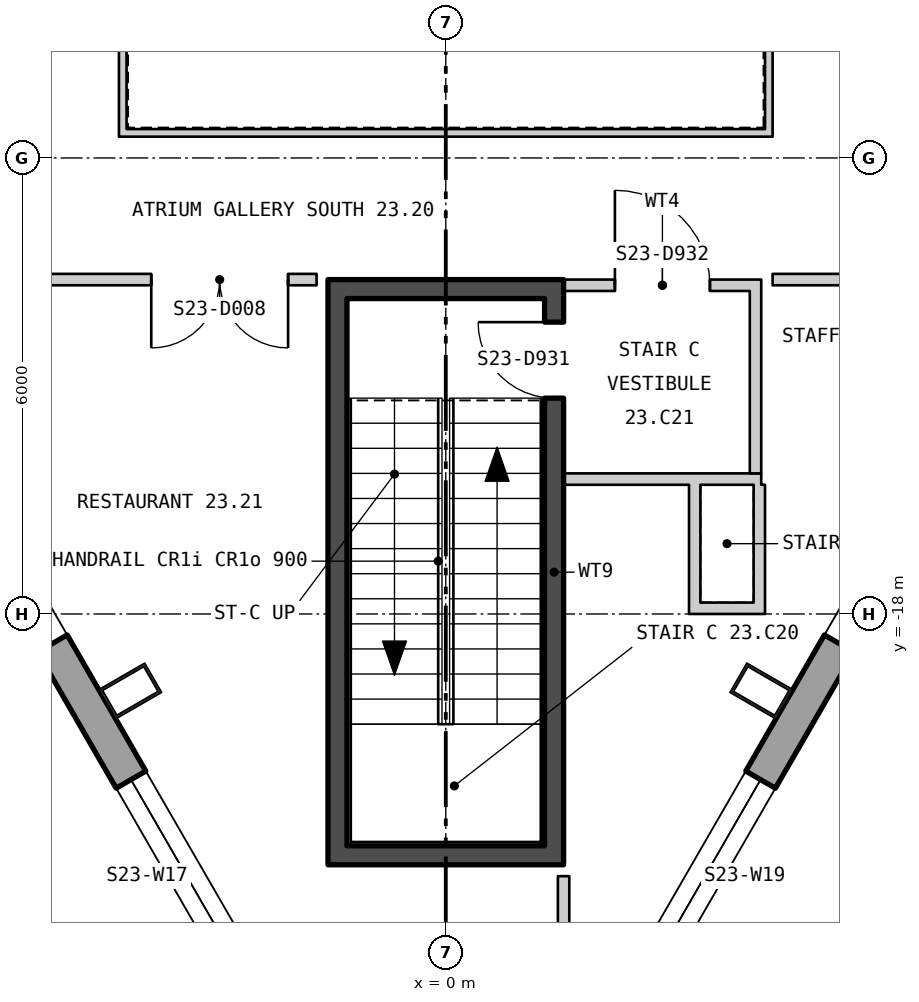
"""IFC4 building model, lengths in metres.
Left out: names, types, materials, properties, quantities, classifications, styles, units other than length and angle.
Written with IfcOpenShell. Run it as: python <this file> out.ifc"""

import sys

from ifc_helpers import new_model, si_unit, direction, frame, frame_2d, origin, origin_2d, place, context, subcontext, project, spatial, polyline, rectangle, hollow_rectangle, outline, extrude, element, fill, save


model = new_model("IFC4")
c1 = context("Model", 3, precision=1e-05, world=origin(), true_north=direction((0.0, 1.0)))
c2 = subcontext(c1, "Body", "Model", "MODEL_VIEW")
j1 = project(units=[si_unit("LENGTHUNIT", "METRE"), si_unit("PLANEANGLEUNIT", "RADIAN")], contexts=[c1])
p1 = place(None, origin())
s1 = spatial("IfcSite", under=j1, at=p1, CompositionType="ELEMENT")
p2 = place(p1, origin())
s2 = spatial("IfcBuilding", under=s1, at=p2, CompositionType="ELEMENT")
p3 = place(p2, frame((0.0, 0.0, 304.2)))
s3 = spatial("IfcBuildingStorey", under=s2, at=p3, CompositionType="ELEMENT", Elevation=304.2)
for number, where, z_axis, x_axis in (
    (1, (-4.151, -19.013, 0.0), (0.0, 0.0, 1.0), (0.5, -0.866, 0.0)),
    (2, (4.151, -19.013, 0.0), (0.0, 0.0, 1.0), (0.5, 0.866, 0.0)),
):
    element("IfcColumn", number, at=place(p3, frame(where, z_axis=z_axis, x_axis=x_axis)), inside=s3, PredefinedType="COLUMN", context=c2, shape_type="SweptSolid", body=[
        extrude(hollow_rectangle(XDim=0.45, YDim=0.7, WallThickness=0.04, at=origin_2d()), origin(), (0.0, 0.0, 1.0), 4.2),
    ])
p4 = place(p3, frame((-25.095, 16.112, -0.18), z_axis=(0.0, 0.0, 1.0), x_axis=(0.500000141277, -0.866025322218, 0.0)))
e3 = element("IfcWall", 3, at=p4, inside=s3, PredefinedType="SOLIDWALL", context=c2, shape_type="SweptSolid", body=[
    extrude(outline(polyline([(-0.13, -0.225), (45.86, -0.225), (45.6, 0.225), (0.13, 0.225), (-0.13, -0.225)])), origin(), (0.0, 0.0, 1.0), 3.98),
])
p5 = place(p4, frame((1.424, 0.0, 1.08)))
e4 = element("IfcOpeningElement", 4, at=p5, cuts=e3, PredefinedType="OPENING", context=c2, shape_type="SweptSolid", body=[
    extrude(rectangle(XDim=2.4, YDim=2.3, at=frame_2d((1.2, 1.15))), frame((0.0, 0.235, 0.0), z_axis=(0.0, -1.0, 0.0), x_axis=(1.0, 0.0, 0.0)), (0.0, 0.0, 1.0), 0.47),
])
p6 = place(p4, frame((5.892, 0.0, 1.08)))
e5 = element("IfcOpeningElement", 5, at=p6, cuts=e3, PredefinedType="OPENING", context=c2, shape_type="SweptSolid", body=[
    extrude(rectangle(XDim=2.4, YDim=2.3, at=frame_2d((1.2, 1.15))), frame((0.0, 0.235, 0.0), z_axis=(0.0, -1.0, 0.0), x_axis=(1.0, 0.0, 0.0)), (0.0, 0.0, 1.0), 0.47),
])
p7 = place(p4, frame((10.399, 0.0, 1.08)))
e6 = element("IfcOpeningElement", 6, at=p7, cuts=e3, PredefinedType="OPENING", context=c2, shape_type="SweptSolid", body=[
    extrude(rectangle(XDim=2.4, YDim=2.3, at=frame_2d((1.2, 1.15))), frame((0.0, 0.235, 0.0), z_axis=(0.0, -1.0, 0.0), x_axis=(1.0, 0.0, 0.0)), (0.0, 0.0, 1.0), 0.47),
])
p8 = place(p4, frame((14.905, 0.0, 1.08)))
e7 = element("IfcOpeningElement", 7, at=p8, cuts=e3, PredefinedType="OPENING", context=c2, shape_type="SweptSolid", body=[
    extrude(rectangle(XDim=2.4, YDim=2.3, at=frame_2d((1.2, 1.15))), frame((0.0, 0.235, 0.0), z_axis=(0.0, -1.0, 0.0), x_axis=(1.0, 0.0, 0.0)), (0.0, 0.0, 1.0), 0.47),
])
p9 = place(p4, frame((19.412, 0.0, 1.08)))
e8 = element("IfcOpeningElement", 8, at=p9, cuts=e3, PredefinedType="OPENING", context=c2, shape_type="SweptSolid", body=[
    extrude(rectangle(XDim=2.4, YDim=2.3, at=frame_2d((1.2, 1.15))), frame((0.0, 0.235, 0.0), z_axis=(0.0, -1.0, 0.0), x_axis=(1.0, 0.0, 0.0)), (0.0, 0.0, 1.0), 0.47),
])
p10 = place(p4, frame((28.425, 0.0, 1.08)))
e9 = element("IfcOpeningElement", 9, at=p10, cuts=e3, PredefinedType="OPENING", context=c2, shape_type="SweptSolid", body=[
    extrude(rectangle(XDim=2.4, YDim=2.3, at=frame_2d((1.2, 1.15))), frame((0.0, 0.235, 0.0), z_axis=(0.0, -1.0, 0.0), x_axis=(1.0, 0.0, 0.0)), (0.0, 0.0, 1.0), 0.47),
])
p11 = place(p4, frame((32.932, 0.0, 1.08)))
e10 = element("IfcOpeningElement", 10, at=p11, cuts=e3, PredefinedType="OPENING", context=c2, shape_type="SweptSolid", body=[
    extrude(rectangle(XDim=2.4, YDim=2.3, at=frame_2d((1.2, 1.15))), frame((0.0, 0.235, 0.0), z_axis=(0.0, -1.0, 0.0), x_axis=(1.0, 0.0, 0.0)), (0.0, 0.0, 1.0), 0.47),
])
p12 = place(p4, frame((37.438, 0.0, 1.08)))
e11 = element("IfcOpeningElement", 11, at=p12, cuts=e3, PredefinedType="OPENING", context=c2, shape_type="SweptSolid", body=[
    extrude(rectangle(XDim=2.4, YDim=2.3, at=frame_2d((1.2, 1.15))), frame((0.0, 0.235, 0.0), z_axis=(0.0, -1.0, 0.0), x_axis=(1.0, 0.0, 0.0)), (0.0, 0.0, 1.0), 0.47),
])
p13 = place(p4, frame((41.907, 0.0, 1.08)))
e12 = element("IfcOpeningElement", 12, at=p13, cuts=e3, PredefinedType="OPENING", context=c2, shape_type="SweptSolid", body=[
    extrude(rectangle(XDim=2.4, YDim=2.3, at=frame_2d((1.2, 1.15))), frame((0.0, 0.235, 0.0), z_axis=(0.0, -1.0, 0.0), x_axis=(1.0, 0.0, 0.0)), (0.0, 0.0, 1.0), 0.47),
])
p14 = place(p3, frame((2.23, -23.491, -0.18), z_axis=(0.0, 0.0, 1.0), x_axis=(0.500000141277, 0.866025322218, 0.0)))
e13 = element("IfcWall", 13, at=p14, inside=s3, PredefinedType="SOLIDWALL", context=c2, shape_type="SweptSolid", body=[
    extrude(outline(polyline([(-0.13, -0.225), (45.86, -0.225), (45.6, 0.225), (0.13, 0.225), (-0.13, -0.225)])), origin(), (0.0, 0.0, 1.0), 3.98),
])
p15 = place(p14, frame((1.424, 0.0, 1.08)))
e14 = element("IfcOpeningElement", 14, at=p15, cuts=e13, PredefinedType="OPENING", context=c2, shape_type="SweptSolid", body=[
    extrude(rectangle(XDim=2.4, YDim=2.3, at=frame_2d((1.2, 1.15))), frame((0.0, 0.235, 0.0), z_axis=(0.0, -1.0, 0.0), x_axis=(1.0, 0.0, 0.0)), (0.0, 0.0, 1.0), 0.47),
])
p16 = place(p14, frame((5.892, 0.0, 1.08)))
e15 = element("IfcOpeningElement", 15, at=p16, cuts=e13, PredefinedType="OPENING", context=c2, shape_type="SweptSolid", body=[
    extrude(rectangle(XDim=2.4, YDim=2.3, at=frame_2d((1.2, 1.15))), frame((0.0, 0.235, 0.0), z_axis=(0.0, -1.0, 0.0), x_axis=(1.0, 0.0, 0.0)), (0.0, 0.0, 1.0), 0.47),
])
p17 = place(p14, frame((10.399, 0.0, 1.08)))
e16 = element("IfcOpeningElement", 16, at=p17, cuts=e13, PredefinedType="OPENING", context=c2, shape_type="SweptSolid", body=[
    extrude(rectangle(XDim=2.4, YDim=2.3, at=frame_2d((1.2, 1.15))), frame((0.0, 0.235, 0.0), z_axis=(0.0, -1.0, 0.0), x_axis=(1.0, 0.0, 0.0)), (0.0, 0.0, 1.0), 0.47),
])
p18 = place(p14, frame((14.905, 0.0, 1.08)))
e17 = element("IfcOpeningElement", 17, at=p18, cuts=e13, PredefinedType="OPENING", context=c2, shape_type="SweptSolid", body=[
    extrude(rectangle(XDim=2.4, YDim=2.3, at=frame_2d((1.2, 1.15))), frame((0.0, 0.235, 0.0), z_axis=(0.0, -1.0, 0.0), x_axis=(1.0, 0.0, 0.0)), (0.0, 0.0, 1.0), 0.47),
])
p19 = place(p14, frame((19.412, 0.0, 1.08)))
e18 = element("IfcOpeningElement", 18, at=p19, cuts=e13, PredefinedType="OPENING", context=c2, shape_type="SweptSolid", body=[
    extrude(rectangle(XDim=2.4, YDim=2.3, at=frame_2d((1.2, 1.15))), frame((0.0, 0.235, 0.0), z_axis=(0.0, -1.0, 0.0), x_axis=(1.0, 0.0, 0.0)), (0.0, 0.0, 1.0), 0.47),
])
p20 = place(p14, frame((23.918, 0.0, 1.08)))
e19 = element("IfcOpeningElement", 19, at=p20, cuts=e13, PredefinedType="OPENING", context=c2, shape_type="SweptSolid", body=[
    extrude(rectangle(XDim=2.4, YDim=2.3, at=frame_2d((1.2, 1.15))), frame((0.0, 0.235, 0.0), z_axis=(0.0, -1.0, 0.0), x_axis=(1.0, 0.0, 0.0)), (0.0, 0.0, 1.0), 0.47),
])
p21 = place(p14, frame((28.425, 0.0, 1.08)))
e20 = element("IfcOpeningElement", 20, at=p21, cuts=e13, PredefinedType="OPENING", context=c2, shape_type="SweptSolid", body=[
    extrude(rectangle(XDim=2.4, YDim=2.3, at=frame_2d((1.2, 1.15))), frame((0.0, 0.235, 0.0), z_axis=(0.0, -1.0, 0.0), x_axis=(1.0, 0.0, 0.0)), (0.0, 0.0, 1.0), 0.47),
])
p22 = place(p14, frame((32.932, 0.0, 1.08)))
e21 = element("IfcOpeningElement", 21, at=p22, cuts=e13, PredefinedType="OPENING", context=c2, shape_type="SweptSolid", body=[
    extrude(rectangle(XDim=2.4, YDim=2.3, at=frame_2d((1.2, 1.15))), frame((0.0, 0.235, 0.0), z_axis=(0.0, -1.0, 0.0), x_axis=(1.0, 0.0, 0.0)), (0.0, 0.0, 1.0), 0.47),
])
p23 = place(p14, frame((37.438, 0.0, 1.08)))
e22 = element("IfcOpeningElement", 22, at=p23, cuts=e13, PredefinedType="OPENING", context=c2, shape_type="SweptSolid", body=[
    extrude(rectangle(XDim=2.4, YDim=2.3, at=frame_2d((1.2, 1.15))), frame((0.0, 0.235, 0.0), z_axis=(0.0, -1.0, 0.0), x_axis=(1.0, 0.0, 0.0)), (0.0, 0.0, 1.0), 0.47),
])
p24 = place(p14, frame((41.907, 0.0, 1.08)))
e23 = element("IfcOpeningElement", 23, at=p24, cuts=e13, PredefinedType="OPENING", context=c2, shape_type="SweptSolid", body=[
    extrude(rectangle(XDim=2.4, YDim=2.3, at=frame_2d((1.2, 1.15))), frame((0.0, 0.235, 0.0), z_axis=(0.0, -1.0, 0.0), x_axis=(1.0, 0.0, 0.0)), (0.0, 0.0, 1.0), 0.47),
])
p25 = place(p3, frame((-4.3, -11.67, 0.0), z_axis=(0.0, 0.0, 1.0), x_axis=(1.0, 0.0, 0.0)))
e24 = element("IfcWall", 24, at=p25, inside=s3, PredefinedType="PARTITIONING", context=c2, shape_type="SweptSolid", body=[
    extrude(rectangle(XDim=8.6, YDim=0.1, at=frame_2d((4.3, 0.0))), origin(), (0.0, 0.0, 1.0), 4.0),
])
for number, where, z_axis, x_axis in (
    (25, (4.25, -11.62, 0.0), (0.0, 0.0, 1.0), (0.0, 1.0, 0.0)),
    (26, (-4.25, -3.58, 0.0), (0.0, 0.0, 1.0), (0.0, -1.0, 0.0)),
):
    element("IfcWall", number, at=place(p3, frame(where, z_axis=z_axis, x_axis=x_axis)), inside=s3, PredefinedType="PARTITIONING", context=c2, shape_type="SweptSolid", body=[
        extrude(rectangle(XDim=8.04, YDim=0.1, at=frame_2d((4.02, 0.0))), origin(), (0.0, 0.0, 1.0), 4.0),
    ])
p26 = place(p3, frame((-1.425, -21.05, 0.0), z_axis=(0.0, 0.0, 1.0), x_axis=(0.0, 1.0, 0.0)))
e27 = element("IfcWall", 27, at=p26, inside=s3, PredefinedType="SHEAR", context=c2, shape_type="SweptSolid", body=[
    extrude(rectangle(XDim=7.2, YDim=0.25, at=frame_2d((3.6, 0.0))), origin(), (0.0, 0.0, 1.0), 4.0),
])
p27 = place(p3, frame((1.425, -21.05, 0.0), z_axis=(0.0, 0.0, 1.0), x_axis=(0.0, 1.0, 0.0)))
e28 = element("IfcWall", 28, at=p27, inside=s3, PredefinedType="SHEAR", context=c2, shape_type="SweptSolid", body=[
    extrude(rectangle(XDim=7.2, YDim=0.25, at=frame_2d((3.6, 0.0))), origin(), (0.0, 0.0, 1.0), 4.0),
])
p28 = place(p27, frame((5.89, 0.0, 0.0)))
e29 = element("IfcOpeningElement", 29, at=p28, cuts=e28, PredefinedType="OPENING", context=c2, shape_type="SweptSolid", body=[
    extrude(rectangle(XDim=1.0, YDim=2.1, at=frame_2d((0.5, 1.05))), frame((0.0, 0.135, 0.0), z_axis=(0.0, -1.0, 0.0), x_axis=(1.0, 0.0, 0.0)), (0.0, 0.0, 1.0), 0.27),
])
for number, where, z_axis, x_axis in (
    (30, (-1.55, -21.175, 0.0), (0.0, 0.0, 1.0), (1.0, 0.0, 0.0)),
    (31, (-1.55, -13.725, 0.0), (0.0, 0.0, 1.0), (1.0, 0.0, 0.0)),
):
    element("IfcWall", number, at=place(p3, frame(where, z_axis=z_axis, x_axis=x_axis)), inside=s3, PredefinedType="SHEAR", context=c2, shape_type="SweptSolid", body=[
        extrude(rectangle(XDim=3.1, YDim=0.25, at=frame_2d((1.55, 0.0))), origin(), (0.0, 0.0, 1.0), 4.0),
    ])
p29 = place(p3, frame((1.55, -16.225, 0.0), z_axis=(0.0, 0.0, 1.0), x_axis=(1.0, 0.0, 0.0)))
e32 = element("IfcWall", 32, at=p29, inside=s3, PredefinedType="PARTITIONING", context=c2, shape_type="SweptSolid", body=[
    extrude(rectangle(XDim=2.6, YDim=0.15, at=frame_2d((1.3, 0.0))), origin(), (0.0, 0.0, 1.0), 4.0),
])
p30 = place(p3, frame((4.075, -16.15, 0.0), z_axis=(0.0, 0.0, 1.0), x_axis=(0.0, 1.0, 0.0)))
e33 = element("IfcWall", 33, at=p30, inside=s3, PredefinedType="PARTITIONING", context=c2, shape_type="SweptSolid", body=[
    extrude(rectangle(XDim=2.4, YDim=0.15, at=frame_2d((1.2, 0.0))), origin(), (0.0, 0.0, 1.0), 4.0),
])
p31 = place(p3, frame((1.55, -13.675, 0.0), z_axis=(0.0, 0.0, 1.0), x_axis=(1.0, 0.0, 0.0)))
e34 = element("IfcWall", 34, at=p31, inside=s3, PredefinedType="PARTITIONING", context=c2, shape_type="SweptSolid", body=[
    extrude(rectangle(XDim=2.6, YDim=0.15, at=frame_2d((1.3, 0.0))), origin(), (0.0, 0.0, 1.0), 3.186),
])
p32 = place(p31, frame((0.675, 0.0, 0.0)))
e35 = element("IfcOpeningElement", 35, at=p32, cuts=e34, PredefinedType="OPENING", context=c2, shape_type="SweptSolid", body=[
    extrude(rectangle(XDim=1.25, YDim=2.1, at=frame_2d((0.625, 1.05))), frame((0.0, 0.085, 0.0), z_axis=(0.0, -1.0, 0.0), x_axis=(1.0, 0.0, 0.0)), (0.0, 0.0, 1.0), 0.17),
])
p33 = place(p3, frame((3.275, -18.0, 0.0), z_axis=(0.0, 0.0, 1.0), x_axis=(0.0, 1.0, 0.0)))
e36 = element("IfcWall", 36, at=p33, inside=s3, PredefinedType="PARTITIONING", context=c2, shape_type="SweptSolid", body=[
    extrude(rectangle(XDim=1.7, YDim=0.15, at=frame_2d((0.85, 0.0))), origin(), (0.0, 0.0, 1.0), 3.55),
])
p34 = place(p3, frame((3.35, -17.925, 0.0), z_axis=(0.0, 0.0, 1.0), x_axis=(1.0, 0.0, 0.0)))
e37 = element("IfcWall", 37, at=p34, inside=s3, PredefinedType="PARTITIONING", context=c2, shape_type="SweptSolid", body=[
    extrude(rectangle(XDim=0.7, YDim=0.15, at=frame_2d((0.35, 0.0))), origin(), (0.0, 0.0, 1.0), 4.0),
])
p35 = place(p3, frame((4.125, -18.0, 0.0), z_axis=(0.0, 0.0, 1.0), x_axis=(0.0, 1.0, 0.0)))
e38 = element("IfcWall", 38, at=p35, inside=s3, PredefinedType="PARTITIONING", context=c2, shape_type="SweptSolid", body=[
    extrude(rectangle(XDim=1.7, YDim=0.15, at=frame_2d((0.85, 0.0))), origin(), (0.0, 0.0, 1.0), 4.0),
])
p36 = place(p3, frame((-7.075, -13.6, 0.0), z_axis=(0.0, 0.0, 1.0), x_axis=(1.0, 0.0, 0.0)))
e39 = element("IfcWall", 39, at=p36, inside=s3, PredefinedType="PARTITIONING", context=c2, shape_type="SweptSolid", body=[
    extrude(rectangle(XDim=5.375, YDim=0.15, at=frame_2d((2.688, 0.0))), origin(), (0.0, 0.0, 1.0), 3.186),
])
p37 = place(p36, frame((3.2, 0.0, 0.0)))
e40 = element("IfcOpeningElement", 40, at=p37, cuts=e39, PredefinedType="OPENING", context=c2, shape_type="SweptSolid", body=[
    extrude(rectangle(XDim=1.8, YDim=2.1, at=frame_2d((0.9, 1.05))), frame((0.0, 0.085, 0.0), z_axis=(0.0, -1.0, 0.0), x_axis=(1.0, 0.0, 0.0)), (0.0, 0.0, 1.0), 0.17),
])
p38 = place(p3, frame((1.55, -22.388, 0.0), z_axis=(0.0, 0.0, 1.0), x_axis=(0.0, 1.0, 0.0)))
e41 = element("IfcWall", 41, at=p38, inside=s3, PredefinedType="PARTITIONING", context=c2, shape_type="SweptSolid", body=[
    extrude(rectangle(XDim=0.938, YDim=0.15, at=frame_2d((0.469, 0.0))), origin(), (0.0, 0.0, 1.0), 4.0),
])
p39 = place(p3, frame((4.3, -13.6, 0.0), z_axis=(0.0, 0.0, 1.0), x_axis=(1.0, 0.0, 0.0)))
e42 = element("IfcWall", 42, at=p39, inside=s3, PredefinedType="PARTITIONING", context=c2, shape_type="SweptSolid", body=[
    extrude(rectangle(XDim=2.775, YDim=0.15, at=frame_2d((1.387, 0.0))), origin(), (0.0, 0.0, 1.0), 3.186),
])
p40 = place(p12, origin())
e43 = element("IfcWindow", 43, at=p40, inside=s3, PartitioningType="SINGLE_PANEL", PredefinedType="WINDOW", context=c2, shape_type="SweptSolid", body=[
    extrude(rectangle(XDim=2.4, YDim=2.3, at=frame_2d((1.2, 1.15))), frame((0.0, 0.105, 0.0), z_axis=(0.0, -1.0, 0.0), x_axis=(1.0, 0.0, 0.0)), (0.0, 0.0, 1.0), 0.06),
])
fill(e11, e43)
p41 = place(p13, origin())
e44 = element("IfcWindow", 44, at=p41, inside=s3, PartitioningType="SINGLE_PANEL", PredefinedType="WINDOW", context=c2, shape_type="SweptSolid", body=[
    extrude(rectangle(XDim=2.4, YDim=2.3, at=frame_2d((1.2, 1.15))), frame((0.0, 0.105, 0.0), z_axis=(0.0, -1.0, 0.0), x_axis=(1.0, 0.0, 0.0)), (0.0, 0.0, 1.0), 0.06),
])
fill(e12, e44)
p42 = place(p15, origin())
e45 = element("IfcWindow", 45, at=p42, inside=s3, PartitioningType="SINGLE_PANEL", PredefinedType="WINDOW", context=c2, shape_type="SweptSolid", body=[
    extrude(rectangle(XDim=2.4, YDim=2.3, at=frame_2d((1.2, 1.15))), frame((0.0, 0.105, 0.0), z_axis=(0.0, -1.0, 0.0), x_axis=(1.0, 0.0, 0.0)), (0.0, 0.0, 1.0), 0.06),
])
fill(e14, e45)
p43 = place(p16, origin())
e46 = element("IfcWindow", 46, at=p43, inside=s3, PartitioningType="SINGLE_PANEL", PredefinedType="WINDOW", context=c2, shape_type="SweptSolid", body=[
    extrude(rectangle(XDim=2.4, YDim=2.3, at=frame_2d((1.2, 1.15))), frame((0.0, 0.105, 0.0), z_axis=(0.0, -1.0, 0.0), x_axis=(1.0, 0.0, 0.0)), (0.0, 0.0, 1.0), 0.06),
])
fill(e15, e46)
p44 = place(p28, origin())
e47 = element("IfcDoor", 47, at=p44, inside=s3, OperationType="SINGLE_SWING_LEFT", PredefinedType="DOOR", context=c2, shape_type="SweptSolid", body=[
    extrude(rectangle(XDim=1.0, YDim=2.1, at=frame_2d((0.5, 1.05))), frame((0.0, 0.025, 0.0), z_axis=(0.0, -1.0, 0.0), x_axis=(1.0, 0.0, 0.0)), (0.0, 0.0, 1.0), 0.05),
])
fill(e29, e47)
p45 = place(p32, origin())
e48 = element("IfcDoor", 48, at=p45, inside=s3, OperationType="SINGLE_SWING_RIGHT", PredefinedType="DOOR", context=c2, shape_type="SweptSolid", body=[
    extrude(rectangle(XDim=1.25, YDim=2.1, at=frame_2d((0.625, 1.05))), frame((0.0, 0.025, 0.0), z_axis=(0.0, -1.0, 0.0), x_axis=(1.0, 0.0, 0.0)), (0.0, 0.0, 1.0), 0.05),
])
fill(e35, e48)
p46 = place(p37, origin())
e49 = element("IfcDoor", 49, at=p46, inside=s3, OperationType="DOUBLE_DOOR_SINGLE_SWING", PredefinedType="DOOR", context=c2, shape_type="SweptSolid", body=[
    extrude(rectangle(XDim=1.8, YDim=2.1, at=frame_2d((0.9, 1.05))), frame((0.0, 0.025, 0.0), z_axis=(0.0, -1.0, 0.0), x_axis=(1.0, 0.0, 0.0)), (0.0, 0.0, 1.0), 0.05),
])
fill(e40, e49)
save(model, sys.argv[1])
